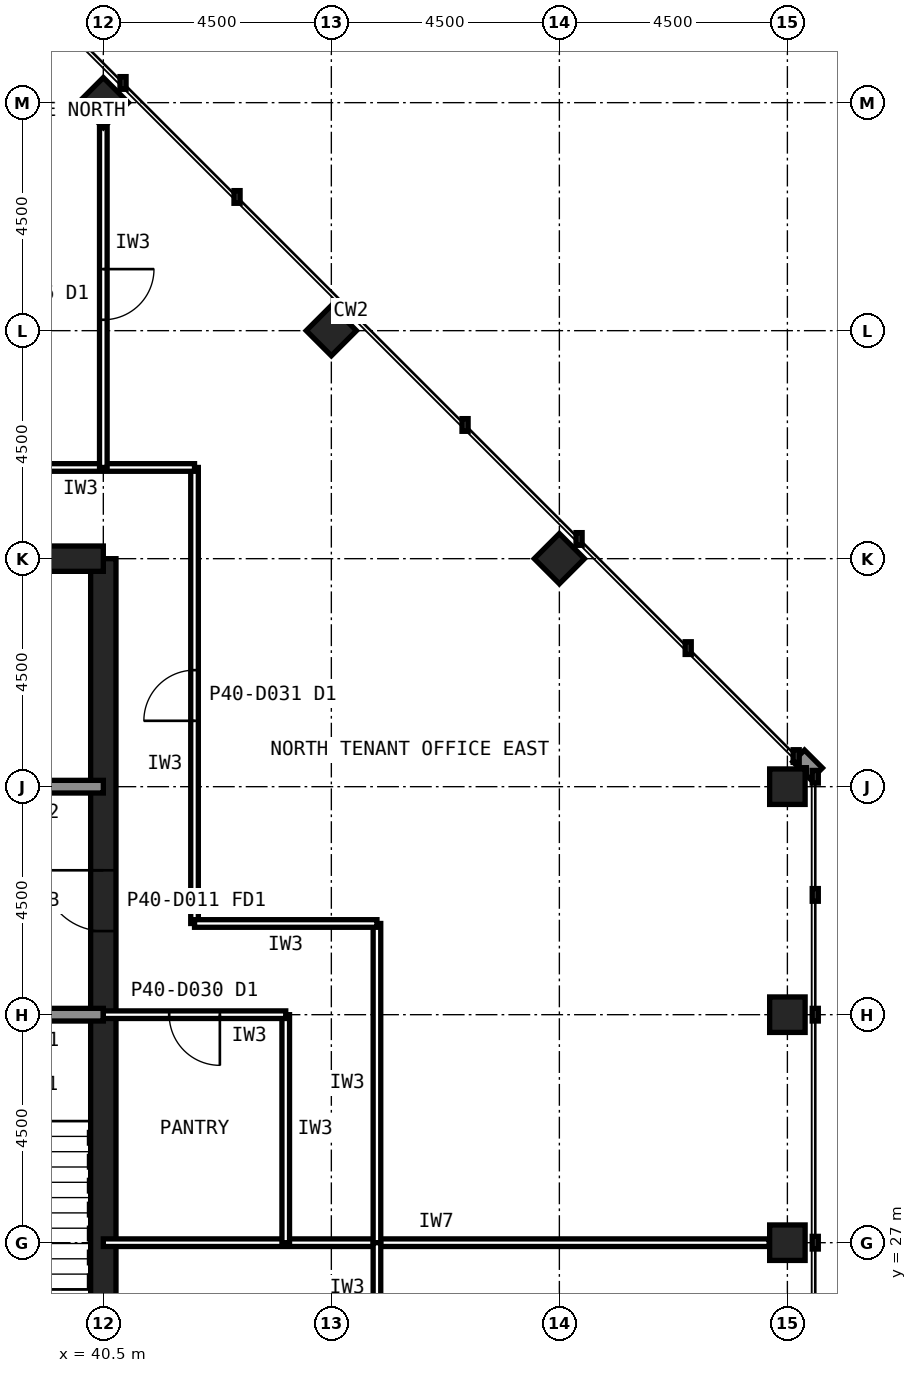
"""IFC4 building model, lengths in metres.
Left out: names, types, materials, properties, quantities, classifications, styles, units other than length and angle.
Written with IfcOpenShell. Run it as: python <this file> out.ifc"""

import sys

from ifc_helpers import new_model, si_unit, direction, frame, frame_2d, origin, origin_2d, place, context, subcontext, project, spatial, rectangle, hollow_rectangle, extrude, element, fill, save


model = new_model("IFC4")
c1 = context("Model", 3, precision=1e-05, world=origin(), true_north=direction((0.0, 1.0)))
c2 = subcontext(c1, "Body", "Model", "MODEL_VIEW")
j1 = project(units=[si_unit("LENGTHUNIT", "METRE"), si_unit("PLANEANGLEUNIT", "RADIAN")], contexts=[c1])
p1 = place(None, origin())
s1 = spatial("IfcSite", under=j1, at=p1, CompositionType="ELEMENT")
p2 = place(p1, origin())
s2 = spatial("IfcBuilding", under=s1, at=p2, CompositionType="ELEMENT")
p3 = place(p2, frame((0.0, 0.0, 167.6)))
s3 = spatial("IfcBuildingStorey", under=s2, at=p3, CompositionType="ELEMENT", Elevation=167.6)
for number, where, z_axis, x_axis in (
    (1, (54.0, 27.0, 0.0), (0.0, 0.0, 1.0), (1.0, 0.0, 0.0)),
    (2, (54.0, 31.5, 0.0), (0.0, 0.0, 1.0), (1.0, 0.0, 0.0)),
    (3, (54.0, 36.0, 0.0), (0.0, 0.0, 1.0), (1.0, 0.0, 0.0)),
    (4, (49.5, 40.5, 0.0), (0.0, 0.0, 1.0), (0.707, 0.707, 0.0)),
    (5, (45.0, 45.0, 0.0), (0.0, 0.0, 1.0), (0.707, 0.707, 0.0)),
    (6, (40.5, 49.5, 0.0), (0.0, 0.0, 1.0), (0.707, 0.707, 0.0)),
):
    element("IfcColumn", number, at=place(p3, frame(where, z_axis=z_axis, x_axis=x_axis)), inside=s3, PredefinedType="COLUMN", context=c2, shape_type="SweptSolid", body=[
        extrude(hollow_rectangle(XDim=0.7, YDim=0.7, WallThickness=0.036, at=origin_2d()), origin(), (0.0, 0.0, 1.0), 4.0),
    ])
p4 = place(p3, frame((40.5, 13.5, 0.0), z_axis=(0.0, 0.0, 1.0), x_axis=(0.0, 1.0, 0.0)))
e7 = element("IfcWall", 7, at=p4, inside=s3, PredefinedType="SHEAR", context=c2, shape_type="SweptSolid", body=[
    extrude(rectangle(XDim=27.0, YDim=0.5, at=frame_2d((13.5, 0.0))), origin(), (0.0, 0.0, 1.0), 4.0),
])
p5 = place(p4, frame((5.85, 0.0, 0.0)))
e8 = element("IfcOpeningElement", 8, at=p5, cuts=e7, PredefinedType="OPENING", context=c2, shape_type="SweptSolid", body=[
    extrude(rectangle(XDim=1.8, YDim=2.1, at=frame_2d((0.9, 1.05))), frame((0.0, 0.26, 0.0), z_axis=(0.0, -1.0, 0.0), x_axis=(1.0, 0.0, 0.0)), (0.0, 0.0, 1.0), 0.52),
])
p6 = place(p4, frame((19.65, 0.0, 0.0)))
e9 = element("IfcOpeningElement", 9, at=p6, cuts=e7, PredefinedType="OPENING", context=c2, shape_type="SweptSolid", body=[
    extrude(rectangle(XDim=1.2, YDim=2.1, at=frame_2d((0.6, 1.05))), frame((0.0, 0.26, 0.0), z_axis=(0.0, -1.0, 0.0), x_axis=(1.0, 0.0, 0.0)), (0.0, 0.0, 1.0), 0.52),
])
p7 = place(p3, frame((40.5, 40.5, 0.0), z_axis=(0.0, 0.0, 1.0), x_axis=(-1.0, 0.0, 0.0)))
e10 = element("IfcWall", 10, at=p7, inside=s3, PredefinedType="SHEAR", context=c2, shape_type="SweptSolid", body=[
    extrude(rectangle(XDim=27.0, YDim=0.5, at=frame_2d((13.5, 0.0))), origin(), (0.0, 0.0, 1.0), 4.0),
])
p8 = place(p3, frame((13.5, 36.0, 0.0), z_axis=(0.0, 0.0, 1.0), x_axis=(1.0, 0.0, 0.0)))
e11 = element("IfcWall", 11, at=p8, inside=s3, PredefinedType="SOLIDWALL", context=c2, shape_type="SweptSolid", body=[
    extrude(rectangle(XDim=27.0, YDim=0.25, at=frame_2d((13.5, 0.0))), origin(), (0.0, 0.0, 1.0), 3.84),
])
p9 = place(p8, frame((1.8, 0.0, 0.0)))
e12 = element("IfcOpeningElement", 12, at=p9, cuts=e11, PredefinedType="OPENING", context=c2, shape_type="SweptSolid", body=[
    extrude(rectangle(XDim=0.9, YDim=2.1, at=frame_2d((0.45, 1.05))), frame((0.0, 0.135, 0.0), z_axis=(0.0, -1.0, 0.0), x_axis=(1.0, 0.0, 0.0)), (0.0, 0.0, 1.0), 0.27),
])
p10 = place(p8, frame((5.55, 0.0, 0.0)))
e13 = element("IfcOpeningElement", 13, at=p10, cuts=e11, PredefinedType="OPENING", context=c2, shape_type="SweptSolid", body=[
    extrude(rectangle(XDim=0.9, YDim=2.1, at=frame_2d((0.45, 1.05))), frame((0.0, 0.135, 0.0), z_axis=(0.0, -1.0, 0.0), x_axis=(1.0, 0.0, 0.0)), (0.0, 0.0, 1.0), 0.27),
])
p11 = place(p8, frame((8.55, 0.0, 0.0)))
e14 = element("IfcOpeningElement", 14, at=p11, cuts=e11, PredefinedType="OPENING", context=c2, shape_type="SweptSolid", body=[
    extrude(rectangle(XDim=0.9, YDim=2.1, at=frame_2d((0.45, 1.05))), frame((0.0, 0.135, 0.0), z_axis=(0.0, -1.0, 0.0), x_axis=(1.0, 0.0, 0.0)), (0.0, 0.0, 1.0), 0.27),
])
p12 = place(p8, frame((24.1, 0.0, 0.0)))
e15 = element("IfcOpeningElement", 15, at=p12, cuts=e11, PredefinedType="OPENING", context=c2, shape_type="SweptSolid", body=[
    extrude(rectangle(XDim=1.3, YDim=2.2, at=frame_2d((0.65, 1.1))), frame((0.0, 0.135, 0.0), z_axis=(0.0, -1.0, 0.0), x_axis=(1.0, 0.0, 0.0)), (0.0, 0.0, 1.0), 0.27),
])
p13 = place(p3, frame((13.5, 31.5, 0.0), z_axis=(0.0, 0.0, 1.0), x_axis=(1.0, 0.0, 0.0)))
e16 = element("IfcWall", 16, at=p13, inside=s3, PredefinedType="SOLIDWALL", context=c2, shape_type="SweptSolid", body=[
    extrude(rectangle(XDim=27.0, YDim=0.25, at=frame_2d((13.5, 0.0))), origin(), (0.0, 0.0, 1.0), 3.84),
])
p14 = place(p13, frame((24.15, 0.0, 0.0)))
e17 = element("IfcOpeningElement", 17, at=p14, cuts=e16, PredefinedType="OPENING", context=c2, shape_type="SweptSolid", body=[
    extrude(rectangle(XDim=1.2, YDim=2.1, at=frame_2d((0.6, 1.05))), frame((0.0, 0.135, 0.0), z_axis=(0.0, -1.0, 0.0), x_axis=(1.0, 0.0, 0.0)), (0.0, 0.0, 1.0), 0.27),
])
p15 = place(p13, frame((15.3, 0.0, 0.0)))
e18 = element("IfcOpeningElement", 18, at=p15, cuts=e16, PredefinedType="OPENING", context=c2, shape_type="SweptSolid", body=[
    extrude(rectangle(XDim=0.9, YDim=2.1, at=frame_2d((0.45, 1.05))), frame((0.0, 0.135, 0.0), z_axis=(0.0, -1.0, 0.0), x_axis=(1.0, 0.0, 0.0)), (0.0, 0.0, 1.0), 0.27),
])
p16 = place(p13, frame((19.8, 0.0, 0.0)))
e19 = element("IfcOpeningElement", 19, at=p16, cuts=e16, PredefinedType="OPENING", context=c2, shape_type="SweptSolid", body=[
    extrude(rectangle(XDim=0.9, YDim=2.1, at=frame_2d((0.45, 1.05))), frame((0.0, 0.135, 0.0), z_axis=(0.0, -1.0, 0.0), x_axis=(1.0, 0.0, 0.0)), (0.0, 0.0, 1.0), 0.27),
])
p17 = place(p3, frame((40.5, 27.0, 0.0), z_axis=(0.0, 0.0, 1.0), x_axis=(1.0, 0.0, 0.0)))
e20 = element("IfcWall", 20, at=p17, inside=s3, PredefinedType="PARTITIONING", context=c2, shape_type="SweptSolid", body=[
    extrude(rectangle(XDim=13.14, YDim=0.15, at=frame_2d((6.57, 0.0))), origin(), (0.0, 0.0, 1.0), 2.989),
])
p18 = place(p3, frame((42.3, 33.3, 0.0), z_axis=(0.0, 0.0, 1.0), x_axis=(0.0, 1.0, 0.0)))
e21 = element("IfcWall", 21, at=p18, inside=s3, PredefinedType="PARTITIONING", context=c2, shape_type="SweptSolid", body=[
    extrude(rectangle(XDim=9.0, YDim=0.15, at=frame_2d((4.5, 0.0))), origin(), (0.0, 0.0, 1.0), 3.84),
])
p19 = place(p18, frame((4.0, 0.0, 0.0)))
e22 = element("IfcOpeningElement", 22, at=p19, cuts=e21, PredefinedType="OPENING", context=c2, shape_type="SweptSolid", body=[
    extrude(rectangle(XDim=1.0, YDim=2.1, at=frame_2d((0.5, 1.05))), frame((0.0, 0.085, 0.0), z_axis=(0.0, -1.0, 0.0), x_axis=(1.0, 0.0, 0.0)), (0.0, 0.0, 1.0), 0.17),
])
p20 = place(p3, frame((45.9, 27.0, 0.0), z_axis=(0.0, 0.0, 1.0), x_axis=(0.0, 1.0, 0.0)))
e23 = element("IfcWall", 23, at=p20, inside=s3, PredefinedType="PARTITIONING", context=c2, shape_type="SweptSolid", body=[
    extrude(rectangle(XDim=6.3, YDim=0.15, at=frame_2d((3.15, 0.0))), origin(), (0.0, 0.0, 1.0), 3.84),
])
p21 = place(p3, frame((42.3, 42.3, 0.0), z_axis=(0.0, 0.0, 1.0), x_axis=(-1.0, 0.0, 0.0)))
e24 = element("IfcWall", 24, at=p21, inside=s3, PredefinedType="PARTITIONING", context=c2, shape_type="SweptSolid", body=[
    extrude(rectangle(XDim=4.5, YDim=0.15, at=frame_2d((2.25, 0.0))), origin(), (0.0, 0.0, 1.0), 3.84),
])
p22 = place(p3, frame((45.9, 33.3, 0.0), z_axis=(0.0, 0.0, 1.0), x_axis=(-1.0, 0.0, 0.0)))
e25 = element("IfcWall", 25, at=p22, inside=s3, PredefinedType="PARTITIONING", context=c2, shape_type="SweptSolid", body=[
    extrude(rectangle(XDim=3.6, YDim=0.15, at=frame_2d((1.8, 0.0))), origin(), (0.0, 0.0, 1.0), 3.84),
])
p23 = place(p3, frame((45.9, 25.2, 0.0), z_axis=(0.0, 0.0, 1.0), x_axis=(0.0, 1.0, 0.0)))
e26 = element("IfcWall", 26, at=p23, inside=s3, PredefinedType="PARTITIONING", context=c2, shape_type="SweptSolid", body=[
    extrude(rectangle(XDim=1.8, YDim=0.15, at=frame_2d((0.9, 0.0))), origin(), (0.0, 0.0, 1.0), 3.84),
])
p24 = place(p3, frame((44.1, 27.0, 0.0), z_axis=(0.0, 0.0, 1.0), x_axis=(0.0, 1.0, 0.0)))
e27 = element("IfcWall", 27, at=p24, inside=s3, PredefinedType="PARTITIONING", context=c2, shape_type="SweptSolid", body=[
    extrude(rectangle(XDim=4.5, YDim=0.15, at=frame_2d((2.25, 0.0))), origin(), (0.0, 0.0, 1.0), 3.84),
])
p25 = place(p3, frame((44.1, 31.5, 0.0), z_axis=(0.0, 0.0, 1.0), x_axis=(-1.0, 0.0, 0.0)))
e28 = element("IfcWall", 28, at=p25, inside=s3, PredefinedType="PARTITIONING", context=c2, shape_type="SweptSolid", body=[
    extrude(rectangle(XDim=3.6, YDim=0.15, at=frame_2d((1.8, 0.0))), origin(), (0.0, 0.0, 1.0), 2.989),
])
p26 = place(p25, frame((1.3, 0.0, 0.0)))
e29 = element("IfcOpeningElement", 29, at=p26, cuts=e28, PredefinedType="OPENING", context=c2, shape_type="SweptSolid", body=[
    extrude(rectangle(XDim=1.0, YDim=2.1, at=frame_2d((0.5, 1.05))), frame((0.0, 0.085, 0.0), z_axis=(0.0, -1.0, 0.0), x_axis=(1.0, 0.0, 0.0)), (0.0, 0.0, 1.0), 0.17),
])
p27 = place(p3, frame((40.5, 49.13, 0.0), z_axis=(0.0, 0.0, 1.0), x_axis=(0.0, -1.0, 0.0)))
e30 = element("IfcWall", 30, at=p27, inside=s3, PredefinedType="PARTITIONING", context=c2, shape_type="SweptSolid", body=[
    extrude(rectangle(XDim=6.83, YDim=0.15, at=frame_2d((3.415, 0.0))), origin(), (0.0, 0.0, 1.0), 2.989),
])
p28 = place(p27, frame((2.915, 0.0, 0.0)))
e31 = element("IfcOpeningElement", 31, at=p28, cuts=e30, PredefinedType="OPENING", context=c2, shape_type="SweptSolid", body=[
    extrude(rectangle(XDim=1.0, YDim=2.1, at=frame_2d((0.5, 1.05))), frame((0.0, 0.085, 0.0), z_axis=(0.0, -1.0, 0.0), x_axis=(1.0, 0.0, 0.0)), (0.0, 0.0, 1.0), 0.17),
])
p29 = place(p6, origin())
e32 = element("IfcDoor", 32, at=p29, inside=s3, OperationType="SINGLE_SWING_RIGHT", PredefinedType="DOOR", context=c2, shape_type="SweptSolid", body=[
    extrude(rectangle(XDim=1.2, YDim=2.1, at=frame_2d((0.6, 1.05))), frame((0.0, 0.025, 0.0), z_axis=(0.0, -1.0, 0.0), x_axis=(1.0, 0.0, 0.0)), (0.0, 0.0, 1.0), 0.05),
])
fill(e9, e32)
p30 = place(p19, origin())
e33 = element("IfcDoor", 33, at=p30, inside=s3, OperationType="SINGLE_SWING_LEFT", PredefinedType="DOOR", context=c2, shape_type="SweptSolid", body=[
    extrude(rectangle(XDim=1.0, YDim=2.1, at=frame_2d((0.5, 1.05))), frame((0.0, 0.025, 0.0), z_axis=(0.0, -1.0, 0.0), x_axis=(1.0, 0.0, 0.0)), (0.0, 0.0, 1.0), 0.05),
])
fill(e22, e33)
p31 = place(p26, origin())
e34 = element("IfcDoor", 34, at=p31, inside=s3, OperationType="SINGLE_SWING_LEFT", PredefinedType="DOOR", context=c2, shape_type="SweptSolid", body=[
    extrude(rectangle(XDim=1.0, YDim=2.1, at=frame_2d((0.5, 1.05))), frame((0.0, 0.025, 0.0), z_axis=(0.0, -1.0, 0.0), x_axis=(1.0, 0.0, 0.0)), (0.0, 0.0, 1.0), 0.05),
])
fill(e29, e34)
p32 = place(p28, origin())
e35 = element("IfcDoor", 35, at=p32, inside=s3, OperationType="SINGLE_SWING_LEFT", PredefinedType="DOOR", context=c2, shape_type="SweptSolid", body=[
    extrude(rectangle(XDim=1.0, YDim=2.1, at=frame_2d((0.5, 1.05))), frame((0.0, 0.025, 0.0), z_axis=(0.0, -1.0, 0.0), x_axis=(1.0, 0.0, 0.0)), (0.0, 0.0, 1.0), 0.05),
])
fill(e31, e35)
save(model, sys.argv[1])
